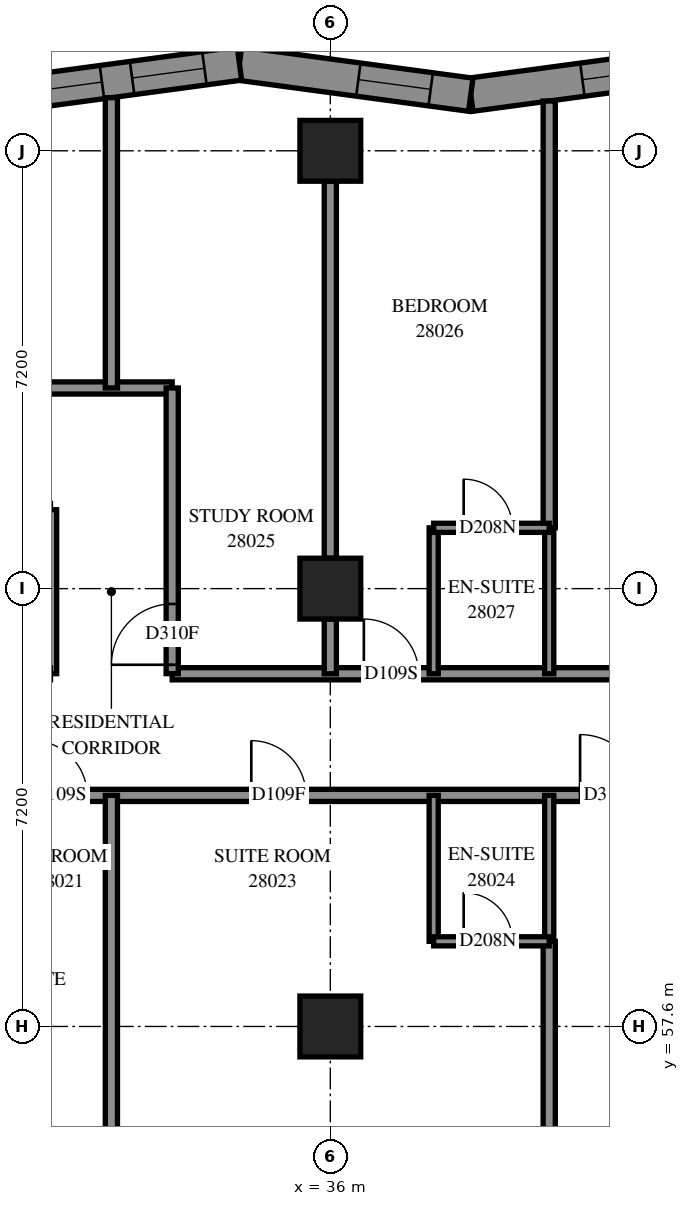
"""IFC4 building model, lengths in metres.
Left out: names, types, materials, properties, quantities, classifications, styles, units other than length and angle.
Written with IfcOpenShell. Run it as: python <this file> out.ifc"""

import sys

from ifc_helpers import new_model, si_unit, direction, frame, frame_2d, origin, origin_2d, place, context, subcontext, project, spatial, polyline, rectangle, outline, extrude, element, fill, save


model = new_model("IFC4")
c1 = context("Model", 3, precision=1e-05, world=origin(), true_north=direction((0.0, 1.0)))
c2 = subcontext(c1, "Body", "Model", "MODEL_VIEW")
j1 = project(units=[si_unit("LENGTHUNIT", "METRE"), si_unit("PLANEANGLEUNIT", "RADIAN")], contexts=[c1])
p1 = place(None, origin())
s1 = spatial("IfcSite", under=j1, at=p1, CompositionType="ELEMENT")
p2 = place(p1, origin())
s2 = spatial("IfcBuilding", under=s1, at=p2, CompositionType="ELEMENT")
p3 = place(p2, frame((0.0, 0.0, 105.0)))
s3 = spatial("IfcBuildingStorey", under=s2, at=p3, CompositionType="ELEMENT", Elevation=105.0)
for number, where, z_axis, x_axis in (
    (1, (36.0, 57.6, 0.0), (0.0, 0.0, 1.0), (1.0, 0.0, 0.0)),
    (2, (36.0, 64.8, 0.0), (0.0, 0.0, 1.0), (1.0, 0.0, 0.0)),
    (3, (36.0, 72.0, 0.0), (0.0, 0.0, 1.0), (1.0, 0.0, 0.0)),
):
    element("IfcColumn", number, at=place(p3, frame(where, z_axis=z_axis, x_axis=x_axis)), inside=s3, PredefinedType="COLUMN", context=c2, shape_type="SweptSolid", body=[
        extrude(rectangle(XDim=1.0, YDim=1.0, at=origin_2d()), origin(), (0.0, 0.0, 1.0), 3.1),
    ])
p4 = place(p3, frame((42.114, 73.434, 0.0), z_axis=(0.0, 0.0, 1.0), x_axis=(-0.9910647018, -0.133381996, 0.0)))
e4 = element("IfcWall", 4, at=p4, inside=s3, PredefinedType="SOLIDWALL", context=c2, shape_type="SweptSolid", body=[
    extrude(outline(polyline([(-0.037, -0.275), (3.802, -0.275), (3.876, 0.275), (0.037, 0.275), (-0.037, -0.275)])), origin(), (0.0, 0.0, 1.0), 3.1),
])
p5 = place(p4, frame((0.787, 0.0, 0.5)))
e5 = element("IfcOpeningElement", 5, at=p5, cuts=e4, PredefinedType="OPENING", context=c2, shape_type="SweptSolid", body=[
    extrude(rectangle(XDim=1.2, YDim=2.45, at=frame_2d((0.6, 1.225))), frame((0.0, 0.285, 0.0), z_axis=(0.0, -1.0, 0.0), x_axis=(1.0, 0.0, 0.0)), (0.0, 0.0, 1.0), 0.57),
])
p6 = place(p3, frame((38.31, 72.922, 0.0), z_axis=(0.0, 0.0, 1.0), x_axis=(-0.9910651652, 0.1333785524, 0.0)))
e6 = element("IfcWall", 6, at=p6, inside=s3, PredefinedType="SOLIDWALL", context=c2, shape_type="SweptSolid", body=[
    extrude(outline(polyline([(0.037, -0.275), (3.876, -0.275), (3.802, 0.275), (-0.037, 0.275), (0.037, -0.275)])), origin(), (0.0, 0.0, 1.0), 3.1),
])
p7 = place(p6, frame((0.665, 0.0, 0.5)))
e7 = element("IfcOpeningElement", 7, at=p7, cuts=e6, PredefinedType="OPENING", context=c2, shape_type="SweptSolid", body=[
    extrude(rectangle(XDim=1.2, YDim=2.45, at=frame_2d((0.6, 1.225))), frame((0.0, 0.285, 0.0), z_axis=(0.0, -1.0, 0.0), x_axis=(1.0, 0.0, 0.0)), (0.0, 0.0, 1.0), 0.57),
])
p8 = place(p3, frame((34.505, 73.434, 0.0), z_axis=(0.0, 0.0, 1.0), x_axis=(-0.9910647018, -0.133381996, 0.0)))
e8 = element("IfcWall", 8, at=p8, inside=s3, PredefinedType="SOLIDWALL", context=c2, shape_type="SweptSolid", body=[
    extrude(outline(polyline([(-0.037, -0.275), (3.802, -0.275), (3.876, 0.275), (0.037, 0.275), (-0.037, -0.275)])), origin(), (0.0, 0.0, 1.0), 3.1),
])
p9 = place(p8, frame((0.581, 0.0, 0.5)))
e9 = element("IfcOpeningElement", 9, at=p9, cuts=e8, PredefinedType="OPENING", context=c2, shape_type="SweptSolid", body=[
    extrude(rectangle(XDim=1.2, YDim=2.45, at=frame_2d((0.6, 1.225))), frame((0.0, 0.285, 0.0), z_axis=(0.0, -1.0, 0.0), x_axis=(1.0, 0.0, 0.0)), (0.0, 0.0, 1.0), 0.57),
])
p10 = place(p8, frame((2.281, 0.0, 0.5)))
e10 = element("IfcOpeningElement", 10, at=p10, cuts=e8, PredefinedType="OPENING", context=c2, shape_type="SweptSolid", body=[
    extrude(rectangle(XDim=1.2, YDim=2.45, at=frame_2d((0.6, 1.225))), frame((0.0, 0.285, 0.0), z_axis=(0.0, -1.0, 0.0), x_axis=(1.0, 0.0, 0.0)), (0.0, 0.0, 1.0), 0.57),
])
p11 = place(p3, frame((28.8, 61.4, 0.0), z_axis=(0.0, 0.0, 1.0), x_axis=(1.0, 0.0, 0.0)))
e11 = element("IfcWall", 11, at=p11, inside=s3, PredefinedType="PARTITIONING", context=c2, shape_type="SweptSolid", body=[
    extrude(rectangle(XDim=24.2, YDim=0.2, at=frame_2d((12.1, 0.0))), origin(), (0.0, 0.0, 1.0), 3.1),
])
p12 = place(p11, frame((2.3, 0.0, 0.0)))
e12 = element("IfcOpeningElement", 12, at=p12, cuts=e11, PredefinedType="OPENING", context=c2, shape_type="SweptSolid", body=[
    extrude(rectangle(XDim=0.9, YDim=2.1, at=frame_2d((0.45, 1.05))), frame((0.0, 0.11, 0.0), z_axis=(0.0, -1.0, 0.0), x_axis=(1.0, 0.0, 0.0)), (0.0, 0.0, 1.0), 0.22),
])
p13 = place(p11, frame((5.901, 0.0, 0.0)))
e13 = element("IfcOpeningElement", 13, at=p13, cuts=e11, PredefinedType="OPENING", context=c2, shape_type="SweptSolid", body=[
    extrude(rectangle(XDim=0.9, YDim=2.1, at=frame_2d((0.45, 1.05))), frame((0.0, 0.11, 0.0), z_axis=(0.0, -1.0, 0.0), x_axis=(1.0, 0.0, 0.0)), (0.0, 0.0, 1.0), 0.22),
])
p14 = place(p11, frame((11.307, 0.0, 0.0)))
e14 = element("IfcOpeningElement", 14, at=p14, cuts=e11, PredefinedType="OPENING", context=c2, shape_type="SweptSolid", body=[
    extrude(rectangle(XDim=1.0, YDim=2.1, at=frame_2d((0.5, 1.05))), frame((0.0, 0.11, 0.0), z_axis=(0.0, -1.0, 0.0), x_axis=(1.0, 0.0, 0.0)), (0.0, 0.0, 1.0), 0.22),
])
p15 = place(p11, frame((16.7, 0.0, 0.0)))
e15 = element("IfcOpeningElement", 15, at=p15, cuts=e11, PredefinedType="OPENING", context=c2, shape_type="SweptSolid", body=[
    extrude(rectangle(XDim=0.9, YDim=2.1, at=frame_2d((0.45, 1.05))), frame((0.0, 0.11, 0.0), z_axis=(0.0, -1.0, 0.0), x_axis=(1.0, 0.0, 0.0)), (0.0, 0.0, 1.0), 0.22),
])
p16 = place(p11, frame((18.508, 0.0, 0.0)))
e16 = element("IfcOpeningElement", 16, at=p16, cuts=e11, PredefinedType="OPENING", context=c2, shape_type="SweptSolid", body=[
    extrude(rectangle(XDim=1.0, YDim=2.1, at=frame_2d((0.5, 1.05))), frame((0.0, 0.11, 0.0), z_axis=(0.0, -1.0, 0.0), x_axis=(1.0, 0.0, 0.0)), (0.0, 0.0, 1.0), 0.22),
])
p17 = place(p11, frame((23.074, 0.0, 0.0)))
e17 = element("IfcOpeningElement", 17, at=p17, cuts=e11, PredefinedType="OPENING", context=c2, shape_type="SweptSolid", body=[
    extrude(rectangle(XDim=1.0, YDim=2.1, at=frame_2d((0.5, 1.05))), frame((0.0, 0.11, 0.0), z_axis=(0.0, -1.0, 0.0), x_axis=(1.0, 0.0, 0.0)), (0.0, 0.0, 1.0), 0.22),
])
p18 = place(p3, frame((33.4, 63.4, 0.0), z_axis=(0.0, 0.0, 1.0), x_axis=(1.0, 0.0, 0.0)))
e18 = element("IfcWall", 18, at=p18, inside=s3, PredefinedType="PARTITIONING", context=c2, shape_type="SweptSolid", body=[
    extrude(rectangle(XDim=21.9, YDim=0.2, at=frame_2d((10.95, 0.0))), origin(), (0.0, 0.0, 1.0), 3.1),
])
p19 = place(p18, frame((3.152, 0.0, 0.0)))
e19 = element("IfcOpeningElement", 19, at=p19, cuts=e18, PredefinedType="OPENING", context=c2, shape_type="SweptSolid", body=[
    extrude(rectangle(XDim=0.9, YDim=2.1, at=frame_2d((0.45, 1.05))), frame((0.0, 0.11, 0.0), z_axis=(0.0, -1.0, 0.0), x_axis=(1.0, 0.0, 0.0)), (0.0, 0.0, 1.0), 0.22),
])
p20 = place(p18, frame((8.161, 0.0, 0.0)))
e20 = element("IfcOpeningElement", 20, at=p20, cuts=e18, PredefinedType="OPENING", context=c2, shape_type="SweptSolid", body=[
    extrude(rectangle(XDim=0.9, YDim=2.1, at=frame_2d((0.45, 1.05))), frame((0.0, 0.11, 0.0), z_axis=(0.0, -1.0, 0.0), x_axis=(1.0, 0.0, 0.0)), (0.0, 0.0, 1.0), 0.22),
])
p21 = place(p18, frame((15.471, 0.0, 0.0)))
e21 = element("IfcOpeningElement", 21, at=p21, cuts=e18, PredefinedType="OPENING", context=c2, shape_type="SweptSolid", body=[
    extrude(rectangle(XDim=1.0, YDim=2.1, at=frame_2d((0.5, 1.05))), frame((0.0, 0.11, 0.0), z_axis=(0.0, -1.0, 0.0), x_axis=(1.0, 0.0, 0.0)), (0.0, 0.0, 1.0), 0.22),
])
p22 = place(p3, frame((21.602, 68.1, 0.0), z_axis=(0.0, 0.0, 1.0), x_axis=(1.0, 0.0, 0.0)))
e22 = element("IfcWall", 22, at=p22, inside=s3, PredefinedType="PARTITIONING", context=c2, shape_type="SweptSolid", body=[
    extrude(rectangle(XDim=11.798, YDim=0.2, at=frame_2d((5.899, 0.0))), origin(), (0.0, 0.0, 1.0), 3.1),
])
p23 = place(p22, frame((5.972, 0.0, 0.0)))
e23 = element("IfcOpeningElement", 23, at=p23, cuts=e22, PredefinedType="OPENING", context=c2, shape_type="SweptSolid", body=[
    extrude(rectangle(XDim=1.0, YDim=2.1, at=frame_2d((0.5, 1.05))), frame((0.0, 0.11, 0.0), z_axis=(0.0, -1.0, 0.0), x_axis=(1.0, 0.0, 0.0)), (0.0, 0.0, 1.0), 0.22),
])
p24 = place(p3, frame((39.6, 65.8, 0.0), z_axis=(0.0, 0.0, 1.0), x_axis=(0.0, 1.0, 0.0)))
e24 = element("IfcWall", 24, at=p24, inside=s3, PredefinedType="PARTITIONING", context=c2, shape_type="SweptSolid", body=[
    extrude(rectangle(XDim=7.019, YDim=0.2, at=frame_2d((3.509, 0.0))), origin(), (0.0, 0.0, 1.0), 3.1),
])
p25 = place(p3, frame((36.0, 65.3, 0.0), z_axis=(0.0, 0.0, 1.0), x_axis=(0.0, 1.0, 0.0)))
e25 = element("IfcWall", 25, at=p25, inside=s3, PredefinedType="PARTITIONING", context=c2, shape_type="SweptSolid", body=[
    extrude(rectangle(XDim=6.2, YDim=0.2, at=frame_2d((3.1, 0.0))), origin(), (0.0, 0.0, 1.0), 3.1),
])
p26 = place(p3, frame((32.4, 55.838, 0.0), z_axis=(0.0, 0.0, 1.0), x_axis=(0.0, 1.0, 0.0)))
e26 = element("IfcWall", 26, at=p26, inside=s3, PredefinedType="PARTITIONING", context=c2, shape_type="SweptSolid", body=[
    extrude(rectangle(XDim=5.562, YDim=0.2, at=frame_2d((2.781, 0.0))), origin(), (0.0, 0.0, 1.0), 3.1),
])
p27 = place(p3, frame((32.4, 68.1, 0.0), z_axis=(0.0, 0.0, 1.0), x_axis=(0.0, 1.0, 0.0)))
e27 = element("IfcWall", 27, at=p27, inside=s3, PredefinedType="PARTITIONING", context=c2, shape_type="SweptSolid", body=[
    extrude(rectangle(XDim=4.774, YDim=0.2, at=frame_2d((2.387, 0.0))), origin(), (0.0, 0.0, 1.0), 3.1),
])
p28 = place(p3, frame((33.4, 63.402, 0.0), z_axis=(0.0, 0.0, 1.0), x_axis=(0.0, 1.0, 0.0)))
e28 = element("IfcWall", 28, at=p28, inside=s3, PredefinedType="PARTITIONING", context=c2, shape_type="SweptSolid", body=[
    extrude(rectangle(XDim=4.698, YDim=0.2, at=frame_2d((2.349, 0.0))), origin(), (0.0, 0.0, 1.0), 3.1),
])
p29 = place(p28, frame((0.146, 0.0, 0.0)))
e29 = element("IfcOpeningElement", 29, at=p29, cuts=e28, PredefinedType="OPENING", context=c2, shape_type="SweptSolid", body=[
    extrude(rectangle(XDim=1.0, YDim=2.1, at=frame_2d((0.5, 1.05))), frame((0.0, 0.11, 0.0), z_axis=(0.0, -1.0, 0.0), x_axis=(1.0, 0.0, 0.0)), (0.0, 0.0, 1.0), 0.22),
])
p30 = place(p3, frame((39.6, 55.838, 0.0), z_axis=(0.0, 0.0, 1.0), x_axis=(0.0, 1.0, 0.0)))
e30 = element("IfcWall", 30, at=p30, inside=s3, PredefinedType="PARTITIONING", context=c2, shape_type="SweptSolid", body=[
    extrude(rectangle(XDim=3.162, YDim=0.2, at=frame_2d((1.581, 0.0))), origin(), (0.0, 0.0, 1.0), 3.1),
])
p31 = place(p3, frame((31.4, 63.402, 0.0), z_axis=(0.0, 0.0, 1.0), x_axis=(0.0, 1.0, 0.0)))
e31 = element("IfcWall", 31, at=p31, inside=s3, PredefinedType="PARTITIONING", context=c2, shape_type="SweptSolid", body=[
    extrude(rectangle(XDim=2.696, YDim=0.2, at=frame_2d((1.348, 0.0))), origin(), (0.0, 0.0, 1.0), 3.1),
])
for number, where, z_axis, x_axis in (
    (32, (37.7, 59.0, 0.0), (0.0, 0.0, 1.0), (0.0, 1.0, 0.0)),
    (33, (37.7, 63.4, 0.0), (0.0, 0.0, 1.0), (0.0, 1.0, 0.0)),
    (34, (39.6, 59.0, 0.0), (0.0, 0.0, 1.0), (0.0, 1.0, 0.0)),
    (35, (39.6, 63.4, 0.0), (0.0, 0.0, 1.0), (0.0, 1.0, 0.0)),
):
    element("IfcWall", number, at=place(p3, frame(where, z_axis=z_axis, x_axis=x_axis)), inside=s3, PredefinedType="PARTITIONING", context=c2, shape_type="SweptSolid", body=[
        extrude(rectangle(XDim=2.4, YDim=0.15, at=frame_2d((1.2, 0.0))), origin(), (0.0, 0.0, 1.0), 3.1),
    ])
p32 = place(p3, frame((37.7, 59.0, 0.0), z_axis=(0.0, 0.0, 1.0), x_axis=(1.0, 0.0, 0.0)))
e36 = element("IfcWall", 36, at=p32, inside=s3, PredefinedType="PARTITIONING", context=c2, shape_type="SweptSolid", body=[
    extrude(rectangle(XDim=1.9, YDim=0.15, at=frame_2d((0.95, 0.0))), origin(), (0.0, 0.0, 1.0), 3.1),
])
p33 = place(p32, frame((0.493, 0.0, 0.0)))
e37 = element("IfcOpeningElement", 37, at=p33, cuts=e36, PredefinedType="OPENING", context=c2, shape_type="SweptSolid", body=[
    extrude(rectangle(XDim=0.8, YDim=2.1, at=frame_2d((0.4, 1.05))), frame((0.0, 0.085, 0.0), z_axis=(0.0, -1.0, 0.0), x_axis=(1.0, 0.0, 0.0)), (0.0, 0.0, 1.0), 0.17),
])
p34 = place(p3, frame((37.7, 65.8, 0.0), z_axis=(0.0, 0.0, 1.0), x_axis=(1.0, 0.0, 0.0)))
e38 = element("IfcWall", 38, at=p34, inside=s3, PredefinedType="PARTITIONING", context=c2, shape_type="SweptSolid", body=[
    extrude(rectangle(XDim=1.9, YDim=0.15, at=frame_2d((0.95, 0.0))), origin(), (0.0, 0.0, 1.0), 3.1),
])
p35 = place(p34, frame((0.493, 0.0, 0.0)))
e39 = element("IfcOpeningElement", 39, at=p35, cuts=e38, PredefinedType="OPENING", context=c2, shape_type="SweptSolid", body=[
    extrude(rectangle(XDim=0.8, YDim=2.1, at=frame_2d((0.4, 1.05))), frame((0.0, 0.085, 0.0), z_axis=(0.0, -1.0, 0.0), x_axis=(1.0, 0.0, 0.0)), (0.0, 0.0, 1.0), 0.17),
])
p36 = place(p3, frame((36.0, 63.4, 0.0), z_axis=(0.0, 0.0, 1.0), x_axis=(0.0, 1.0, 0.0)))
e40 = element("IfcWall", 40, at=p36, inside=s3, PredefinedType="PARTITIONING", context=c2, shape_type="SweptSolid", body=[
    extrude(rectangle(XDim=0.9, YDim=0.2, at=frame_2d((0.45, 0.0))), origin(), (0.0, 0.0, 1.0), 3.1),
])
p37 = place(p5, origin())
e41 = element("IfcWindow", 41, at=p37, inside=s3, PartitioningType="SINGLE_PANEL", PredefinedType="WINDOW", context=c2, shape_type="SweptSolid", body=[
    extrude(rectangle(XDim=1.2, YDim=2.45, at=frame_2d((0.6, 1.225))), frame((0.0, 0.155, 0.0), z_axis=(0.0, -1.0, 0.0), x_axis=(1.0, 0.0, 0.0)), (0.0, 0.0, 1.0), 0.06),
])
fill(e5, e41)
p38 = place(p7, origin())
e42 = element("IfcWindow", 42, at=p38, inside=s3, PartitioningType="SINGLE_PANEL", PredefinedType="WINDOW", context=c2, shape_type="SweptSolid", body=[
    extrude(rectangle(XDim=1.2, YDim=2.45, at=frame_2d((0.6, 1.225))), frame((0.0, 0.155, 0.0), z_axis=(0.0, -1.0, 0.0), x_axis=(1.0, 0.0, 0.0)), (0.0, 0.0, 1.0), 0.06),
])
fill(e7, e42)
p39 = place(p9, origin())
e43 = element("IfcWindow", 43, at=p39, inside=s3, PartitioningType="SINGLE_PANEL", PredefinedType="WINDOW", context=c2, shape_type="SweptSolid", body=[
    extrude(rectangle(XDim=1.2, YDim=2.45, at=frame_2d((0.6, 1.225))), frame((0.0, 0.155, 0.0), z_axis=(0.0, -1.0, 0.0), x_axis=(1.0, 0.0, 0.0)), (0.0, 0.0, 1.0), 0.06),
])
fill(e9, e43)
p40 = place(p10, origin())
e44 = element("IfcWindow", 44, at=p40, inside=s3, PartitioningType="SINGLE_PANEL", PredefinedType="WINDOW", context=c2, shape_type="SweptSolid", body=[
    extrude(rectangle(XDim=1.2, YDim=2.45, at=frame_2d((0.6, 1.225))), frame((0.0, 0.155, 0.0), z_axis=(0.0, -1.0, 0.0), x_axis=(1.0, 0.0, 0.0)), (0.0, 0.0, 1.0), 0.06),
])
fill(e10, e44)
p41 = place(p12, origin())
e45 = element("IfcDoor", 45, at=p41, inside=s3, OperationType="SINGLE_SWING_LEFT", PredefinedType="DOOR", context=c2, shape_type="SweptSolid", body=[
    extrude(rectangle(XDim=0.9, YDim=2.1, at=frame_2d((0.45, 1.05))), frame((0.0, 0.025, 0.0), z_axis=(0.0, -1.0, 0.0), x_axis=(1.0, 0.0, 0.0)), (0.0, 0.0, 1.0), 0.05),
])
fill(e12, e45)
p42 = place(p13, origin())
e46 = element("IfcDoor", 46, at=p42, inside=s3, OperationType="SINGLE_SWING_RIGHT", PredefinedType="DOOR", context=c2, shape_type="SweptSolid", body=[
    extrude(rectangle(XDim=0.9, YDim=2.1, at=frame_2d((0.45, 1.05))), frame((0.0, 0.025, 0.0), z_axis=(0.0, -1.0, 0.0), x_axis=(1.0, 0.0, 0.0)), (0.0, 0.0, 1.0), 0.05),
])
fill(e13, e46)
p43 = place(p33, origin())
e47 = element("IfcDoor", 47, at=p43, inside=s3, OperationType="SINGLE_SWING_RIGHT", PredefinedType="DOOR", context=c2, shape_type="SweptSolid", body=[
    extrude(rectangle(XDim=0.8, YDim=2.1, at=frame_2d((0.4, 1.05))), frame((0.0, 0.025, 0.0), z_axis=(0.0, -1.0, 0.0), x_axis=(1.0, 0.0, 0.0)), (0.0, 0.0, 1.0), 0.05),
])
fill(e37, e47)
p44 = place(p29, origin())
e48 = element("IfcDoor", 48, at=p44, inside=s3, OperationType="SINGLE_SWING_LEFT", PredefinedType="DOOR", context=c2, shape_type="SweptSolid", body=[
    extrude(rectangle(XDim=1.0, YDim=2.1, at=frame_2d((0.5, 1.05))), frame((0.0, 0.025, 0.0), z_axis=(0.0, -1.0, 0.0), x_axis=(1.0, 0.0, 0.0)), (0.0, 0.0, 1.0), 0.05),
])
fill(e29, e48)
p45 = place(p19, origin())
e49 = element("IfcDoor", 49, at=p45, inside=s3, OperationType="SINGLE_SWING_RIGHT", PredefinedType="DOOR", context=c2, shape_type="SweptSolid", body=[
    extrude(rectangle(XDim=0.9, YDim=2.1, at=frame_2d((0.45, 1.05))), frame((0.0, 0.025, 0.0), z_axis=(0.0, -1.0, 0.0), x_axis=(1.0, 0.0, 0.0)), (0.0, 0.0, 1.0), 0.05),
])
fill(e19, e49)
p46 = place(p35, origin())
e50 = element("IfcDoor", 50, at=p46, inside=s3, OperationType="SINGLE_SWING_RIGHT", PredefinedType="DOOR", context=c2, shape_type="SweptSolid", body=[
    extrude(rectangle(XDim=0.8, YDim=2.1, at=frame_2d((0.4, 1.05))), frame((0.0, 0.025, 0.0), z_axis=(0.0, -1.0, 0.0), x_axis=(1.0, 0.0, 0.0)), (0.0, 0.0, 1.0), 0.05),
])
fill(e39, e50)
p47 = place(p14, origin())
e51 = element("IfcDoor", 51, at=p47, inside=s3, OperationType="SINGLE_SWING_RIGHT", PredefinedType="DOOR", context=c2, shape_type="SweptSolid", body=[
    extrude(rectangle(XDim=1.0, YDim=2.1, at=frame_2d((0.5, 1.05))), frame((0.0, 0.025, 0.0), z_axis=(0.0, -1.0, 0.0), x_axis=(1.0, 0.0, 0.0)), (0.0, 0.0, 1.0), 0.05),
])
fill(e14, e51)
save(model, sys.argv[1])
